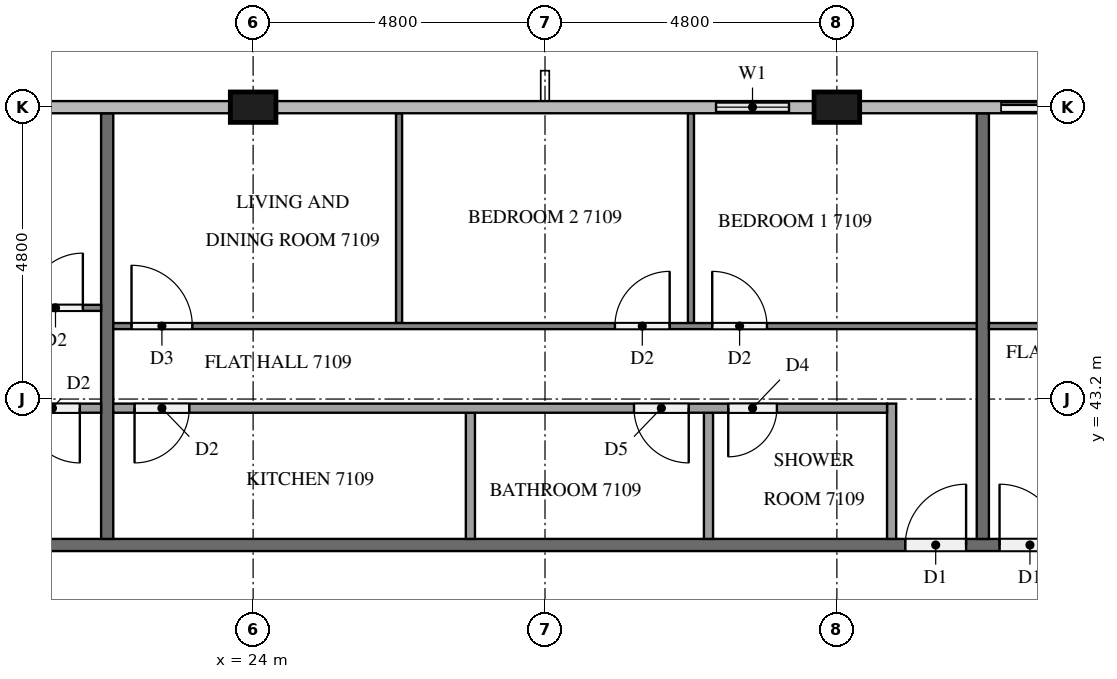
"""IFC4 building model, lengths in metres.
Left out: names, types, materials, properties, quantities, classifications, styles, units other than length and angle.
Written with IfcOpenShell. Run it as: python <this file> out.ifc"""

import sys

from ifc_helpers import new_model, si_unit, direction, frame, frame_2d, origin, origin_2d, place, context, subcontext, project, spatial, rectangle, extrude, element, fill, save


model = new_model("IFC4")
c1 = context("Model", 3, precision=1e-05, world=origin(), true_north=direction((0.0, 1.0)))
c2 = subcontext(c1, "Body", "Model", "MODEL_VIEW")
j1 = project(units=[si_unit("LENGTHUNIT", "METRE"), si_unit("PLANEANGLEUNIT", "RADIAN")], contexts=[c1])
p1 = place(None, origin())
s1 = spatial("IfcSite", under=j1, at=p1, CompositionType="ELEMENT")
p2 = place(p1, origin())
s2 = spatial("IfcBuilding", under=s1, at=p2, CompositionType="ELEMENT")
p3 = place(p2, frame((0.0, 0.0, 272.1)))
s3 = spatial("IfcBuildingStorey", under=s2, at=p3, CompositionType="ELEMENT", Elevation=272.1)
for number, where, z_axis, x_axis in (
    (1, (33.6, 48.0, 0.0), (0.0, 0.0, 1.0), (1.0, 0.0, 0.0)),
    (2, (24.0, 48.0, 0.0), (0.0, 0.0, 1.0), (1.0, 0.0, 0.0)),
):
    element("IfcColumn", number, at=place(p3, frame(where, z_axis=z_axis, x_axis=x_axis)), inside=s3, PredefinedType="COLUMN", context=c2, shape_type="SweptSolid", body=[
        extrude(rectangle(XDim=0.75, YDim=0.5, at=origin_2d()), origin(), (0.0, 0.0, 1.0), 3.2),
    ])
p4 = place(p3, frame((38.4, 48.0, 0.0), z_axis=(0.0, 0.0, 1.0), x_axis=(-1.0, 0.0, 0.0)))
e3 = element("IfcWall", 3, at=p4, inside=s3, PredefinedType="SOLIDWALL", context=c2, shape_type="SweptSolid", body=[
    extrude(rectangle(XDim=2.4, YDim=0.15, at=frame_2d((1.2, 0.0))), origin(), (0.0, 0.0, 1.0), 3.2),
])
p5 = place(p4, frame((0.3, 0.0, 0.0)))
e4 = element("IfcOpeningElement", 4, at=p5, cuts=e3, PredefinedType="OPENING", context=c2, shape_type="SweptSolid", body=[
    extrude(rectangle(XDim=1.8, YDim=2.4, at=frame_2d((0.9, 1.2))), frame((0.0, 0.085, 0.0), z_axis=(0.0, -1.0, 0.0), x_axis=(1.0, 0.0, 0.0)), (0.0, 0.0, 1.0), 0.17),
])
p6 = place(p3, frame((33.225, 48.0, 0.0), z_axis=(0.0, 0.0, 1.0), x_axis=(-1.0, 0.0, 0.0)))
e5 = element("IfcWall", 5, at=p6, inside=s3, PredefinedType="SOLIDWALL", context=c2, shape_type="SweptSolid", body=[
    extrude(rectangle(XDim=2.025, YDim=0.15, at=frame_2d((1.013, 0.0))), origin(), (0.0, 0.0, 1.0), 3.2),
])
p7 = place(p6, frame((0.413, 0.0, 0.9)))
e6 = element("IfcOpeningElement", 6, at=p7, cuts=e5, PredefinedType="OPENING", context=c2, shape_type="SweptSolid", body=[
    extrude(rectangle(XDim=1.2, YDim=1.4, at=frame_2d((0.6, 0.7))), frame((0.0, 0.085, 0.0), z_axis=(0.0, -1.0, 0.0), x_axis=(1.0, 0.0, 0.0)), (0.0, 0.0, 1.0), 0.17),
])
p8 = place(p3, frame((11.9, 40.8, 0.0), z_axis=(0.0, 0.0, 1.0), x_axis=(1.0, 0.0, 0.0)))
e7 = element("IfcWall", 7, at=p8, inside=s3, PredefinedType="PARTITIONING", context=c2, shape_type="SweptSolid", body=[
    extrude(rectangle(XDim=38.6, YDim=0.2, at=frame_2d((19.3, 0.0))), origin(), (0.0, 0.0, 1.0), 3.2),
])
p9 = place(p8, frame((31.575, 0.0, 0.0)))
e8 = element("IfcOpeningElement", 8, at=p9, cuts=e7, PredefinedType="OPENING", context=c2, shape_type="SweptSolid", body=[
    extrude(rectangle(XDim=1.0, YDim=2.1, at=frame_2d((0.5, 1.05))), frame((0.0, 0.11, 0.0), z_axis=(0.0, -1.0, 0.0), x_axis=(1.0, 0.0, 0.0)), (0.0, 0.0, 1.0), 0.22),
])
p10 = place(p8, frame((24.375, 0.0, 0.0)))
e9 = element("IfcOpeningElement", 9, at=p10, cuts=e7, PredefinedType="OPENING", context=c2, shape_type="SweptSolid", body=[
    extrude(rectangle(XDim=1.0, YDim=2.1, at=frame_2d((0.5, 1.05))), frame((0.0, 0.11, 0.0), z_axis=(0.0, -1.0, 0.0), x_axis=(1.0, 0.0, 0.0)), (0.0, 0.0, 1.0), 0.22),
])
p11 = place(p8, frame((22.825, 0.0, 0.0)))
e10 = element("IfcOpeningElement", 10, at=p11, cuts=e7, PredefinedType="OPENING", context=c2, shape_type="SweptSolid", body=[
    extrude(rectangle(XDim=1.0, YDim=2.1, at=frame_2d((0.5, 1.05))), frame((0.0, 0.11, 0.0), z_axis=(0.0, -1.0, 0.0), x_axis=(1.0, 0.0, 0.0)), (0.0, 0.0, 1.0), 0.22),
])
p12 = place(p8, frame((0.375, 0.0, 0.0)))
e11 = element("IfcOpeningElement", 11, at=p12, cuts=e7, PredefinedType="OPENING", context=c2, shape_type="SweptSolid", body=[
    extrude(rectangle(XDim=1.0, YDim=2.1, at=frame_2d((0.5, 1.05))), frame((0.0, 0.11, 0.0), z_axis=(0.0, -1.0, 0.0), x_axis=(1.0, 0.0, 0.0)), (0.0, 0.0, 1.0), 0.22),
])
for number, where, z_axis, x_axis in (
    (12, (36.0, 47.9, 0.0), (0.0, 0.0, 1.0), (0.0, -1.0, 0.0)),
    (13, (21.6, 47.9, 0.0), (0.0, 0.0, 1.0), (0.0, -1.0, 0.0)),
):
    element("IfcWall", number, at=place(p3, frame(where, z_axis=z_axis, x_axis=x_axis)), inside=s3, PredefinedType="PARTITIONING", context=c2, shape_type="SweptSolid", body=[
        extrude(rectangle(XDim=7.0, YDim=0.2, at=frame_2d((3.5, 0.0))), origin(), (0.0, 0.0, 1.0), 3.2),
    ])
p13 = place(p3, frame((36.1, 44.4, 0.0), z_axis=(0.0, 0.0, 1.0), x_axis=(1.0, 0.0, 0.0)))
e14 = element("IfcWall", 14, at=p13, inside=s3, PredefinedType="PARTITIONING", context=c2, shape_type="SweptSolid", body=[
    extrude(rectangle(XDim=7.0, YDim=0.1, at=frame_2d((3.5, 0.0))), origin(), (0.0, 0.0, 1.0), 3.2),
])
p14 = place(p13, frame((5.7, 0.0, 0.0)))
e15 = element("IfcOpeningElement", 15, at=p14, cuts=e14, PredefinedType="OPENING", context=c2, shape_type="SweptSolid", body=[
    extrude(rectangle(XDim=1.0, YDim=2.1, at=frame_2d((0.5, 1.05))), frame((0.0, 0.06, 0.0), z_axis=(0.0, -1.0, 0.0), x_axis=(1.0, 0.0, 0.0)), (0.0, 0.0, 1.0), 0.12),
])
for number, where, z_axis, x_axis in (
    (16, (31.2, 44.45, 0.0), (0.0, 0.0, 1.0), (0.0, 1.0, 0.0)),
    (17, (26.4, 44.45, 0.0), (0.0, 0.0, 1.0), (0.0, 1.0, 0.0)),
):
    element("IfcWall", number, at=place(p3, frame(where, z_axis=z_axis, x_axis=x_axis)), inside=s3, PredefinedType="PARTITIONING", context=c2, shape_type="SweptSolid", body=[
        extrude(rectangle(XDim=3.45, YDim=0.1, at=frame_2d((1.725, 0.0))), origin(), (0.0, 0.0, 1.0), 3.2),
    ])
p15 = place(p3, frame((21.7, 44.4, 0.0), z_axis=(0.0, 0.0, 1.0), x_axis=(1.0, 0.0, 0.0)))
e18 = element("IfcWall", 18, at=p15, inside=s3, PredefinedType="PARTITIONING", context=c2, shape_type="SweptSolid", body=[
    extrude(rectangle(XDim=14.2, YDim=0.1, at=frame_2d((7.1, 0.0))), origin(), (0.0, 0.0, 1.0), 3.2),
])
p16 = place(p15, frame((9.85, 0.0, 0.0)))
e19 = element("IfcOpeningElement", 19, at=p16, cuts=e18, PredefinedType="OPENING", context=c2, shape_type="SweptSolid", body=[
    extrude(rectangle(XDim=0.9, YDim=2.1, at=frame_2d((0.45, 1.05))), frame((0.0, 0.06, 0.0), z_axis=(0.0, -1.0, 0.0), x_axis=(1.0, 0.0, 0.0)), (0.0, 0.0, 1.0), 0.12),
])
p17 = place(p15, frame((8.25, 0.0, 0.0)))
e20 = element("IfcOpeningElement", 20, at=p17, cuts=e18, PredefinedType="OPENING", context=c2, shape_type="SweptSolid", body=[
    extrude(rectangle(XDim=0.9, YDim=2.1, at=frame_2d((0.45, 1.05))), frame((0.0, 0.06, 0.0), z_axis=(0.0, -1.0, 0.0), x_axis=(1.0, 0.0, 0.0)), (0.0, 0.0, 1.0), 0.12),
])
p18 = place(p15, frame((0.3, 0.0, 0.0)))
e21 = element("IfcOpeningElement", 21, at=p18, cuts=e18, PredefinedType="OPENING", context=c2, shape_type="SweptSolid", body=[
    extrude(rectangle(XDim=1.0, YDim=2.1, at=frame_2d((0.5, 1.05))), frame((0.0, 0.06, 0.0), z_axis=(0.0, -1.0, 0.0), x_axis=(1.0, 0.0, 0.0)), (0.0, 0.0, 1.0), 0.12),
])
for number, where, z_axis, x_axis in (
    (22, (31.489, 40.9, 0.0), (0.0, 0.0, 1.0), (0.0, 1.0, 0.0)),
    (23, (27.573, 40.9, 0.0), (0.0, 0.0, 1.0), (0.0, 1.0, 0.0)),
):
    element("IfcWall", number, at=place(p3, frame(where, z_axis=z_axis, x_axis=x_axis)), inside=s3, PredefinedType="PARTITIONING", context=c2, shape_type="SweptSolid", body=[
        extrude(rectangle(XDim=2.075, YDim=0.15, at=frame_2d((1.038, 0.0))), origin(), (0.0, 0.0, 1.0), 3.2),
    ])
p19 = place(p3, frame((34.5, 40.9, 0.0), z_axis=(0.0, 0.0, 1.0), x_axis=(0.0, 1.0, 0.0)))
e24 = element("IfcWall", 24, at=p19, inside=s3, PredefinedType="PARTITIONING", context=c2, shape_type="SweptSolid", body=[
    extrude(rectangle(XDim=2.225, YDim=0.15, at=frame_2d((1.113, 0.0))), origin(), (0.0, 0.0, 1.0), 3.2),
])
p20 = place(p3, frame((34.425, 43.05, 0.0), z_axis=(0.0, 0.0, 1.0), x_axis=(-1.0, 0.0, 0.0)))
e25 = element("IfcWall", 25, at=p20, inside=s3, PredefinedType="PARTITIONING", context=c2, shape_type="SweptSolid", body=[
    extrude(rectangle(XDim=12.725, YDim=0.15, at=frame_2d((6.363, 0.0))), origin(), (0.0, 0.0, 1.0), 3.2),
])
p21 = place(p20, frame((1.812, 0.0, 0.0)))
e26 = element("IfcOpeningElement", 26, at=p21, cuts=e25, PredefinedType="OPENING", context=c2, shape_type="SweptSolid", body=[
    extrude(rectangle(XDim=0.8, YDim=2.1, at=frame_2d((0.4, 1.05))), frame((0.0, 0.085, 0.0), z_axis=(0.0, -1.0, 0.0), x_axis=(1.0, 0.0, 0.0)), (0.0, 0.0, 1.0), 0.17),
])
p22 = place(p20, frame((3.261, 0.0, 0.0)))
e27 = element("IfcOpeningElement", 27, at=p22, cuts=e25, PredefinedType="OPENING", context=c2, shape_type="SweptSolid", body=[
    extrude(rectangle(XDim=0.9, YDim=2.1, at=frame_2d((0.45, 1.05))), frame((0.0, 0.085, 0.0), z_axis=(0.0, -1.0, 0.0), x_axis=(1.0, 0.0, 0.0)), (0.0, 0.0, 1.0), 0.17),
])
p23 = place(p20, frame((11.475, 0.0, 0.0)))
e28 = element("IfcOpeningElement", 28, at=p23, cuts=e25, PredefinedType="OPENING", context=c2, shape_type="SweptSolid", body=[
    extrude(rectangle(XDim=0.9, YDim=2.1, at=frame_2d((0.45, 1.05))), frame((0.0, 0.085, 0.0), z_axis=(0.0, -1.0, 0.0), x_axis=(1.0, 0.0, 0.0)), (0.0, 0.0, 1.0), 0.17),
])
p24 = place(p3, frame((12.1, 44.7, 0.0), z_axis=(0.0, 0.0, 1.0), x_axis=(1.0, 0.0, 0.0)))
e29 = element("IfcWall", 29, at=p24, inside=s3, PredefinedType="PARTITIONING", context=c2, shape_type="SweptSolid", body=[
    extrude(rectangle(XDim=9.4, YDim=0.1, at=frame_2d((4.7, 0.0))), origin(), (0.0, 0.0, 1.0), 3.2),
])
p25 = place(p24, frame((0.3, 0.0, 0.0)))
e30 = element("IfcOpeningElement", 30, at=p25, cuts=e29, PredefinedType="OPENING", context=c2, shape_type="SweptSolid", body=[
    extrude(rectangle(XDim=1.0, YDim=2.1, at=frame_2d((0.5, 1.05))), frame((0.0, 0.06, 0.0), z_axis=(0.0, -1.0, 0.0), x_axis=(1.0, 0.0, 0.0)), (0.0, 0.0, 1.0), 0.12),
])
p26 = place(p24, frame((8.2, 0.0, 0.0)))
e31 = element("IfcOpeningElement", 31, at=p26, cuts=e29, PredefinedType="OPENING", context=c2, shape_type="SweptSolid", body=[
    extrude(rectangle(XDim=0.9, YDim=2.1, at=frame_2d((0.45, 1.05))), frame((0.0, 0.06, 0.0), z_axis=(0.0, -1.0, 0.0), x_axis=(1.0, 0.0, 0.0)), (0.0, 0.0, 1.0), 0.12),
])
p27 = place(p3, frame((21.5, 43.05, 0.0), z_axis=(0.0, 0.0, 1.0), x_axis=(-1.0, 0.0, 0.0)))
e32 = element("IfcWall", 32, at=p27, inside=s3, PredefinedType="PARTITIONING", context=c2, shape_type="SweptSolid", body=[
    extrude(rectangle(XDim=7.925, YDim=0.15, at=frame_2d((3.962, 0.0))), origin(), (0.0, 0.0, 1.0), 3.2),
])
p28 = place(p27, frame((6.825, 0.0, 0.0)))
e33 = element("IfcOpeningElement", 33, at=p28, cuts=e32, PredefinedType="OPENING", context=c2, shape_type="SweptSolid", body=[
    extrude(rectangle(XDim=0.8, YDim=2.1, at=frame_2d((0.4, 1.05))), frame((0.0, 0.085, 0.0), z_axis=(0.0, -1.0, 0.0), x_axis=(1.0, 0.0, 0.0)), (0.0, 0.0, 1.0), 0.17),
])
p29 = place(p27, frame((0.35, 0.0, 0.0)))
e34 = element("IfcOpeningElement", 34, at=p29, cuts=e32, PredefinedType="OPENING", context=c2, shape_type="SweptSolid", body=[
    extrude(rectangle(XDim=0.9, YDim=2.1, at=frame_2d((0.45, 1.05))), frame((0.0, 0.085, 0.0), z_axis=(0.0, -1.0, 0.0), x_axis=(1.0, 0.0, 0.0)), (0.0, 0.0, 1.0), 0.17),
])
p30 = place(p5, origin())
e35 = element("IfcDoor", 35, at=p30, inside=s3, OperationType="SLIDING_TO_RIGHT", PredefinedType="DOOR", context=c2, shape_type="SweptSolid", body=[
    extrude(rectangle(XDim=1.8, YDim=2.4, at=frame_2d((0.9, 1.2))), frame((0.0, 0.025, 0.0), z_axis=(0.0, -1.0, 0.0), x_axis=(1.0, 0.0, 0.0)), (0.0, 0.0, 1.0), 0.05),
])
fill(e4, e35)
p31 = place(p7, origin())
e36 = element("IfcWindow", 36, at=p31, inside=s3, PartitioningType="SINGLE_PANEL", PredefinedType="WINDOW", context=c2, shape_type="SweptSolid", body=[
    extrude(rectangle(XDim=1.2, YDim=1.4, at=frame_2d((0.6, 0.7))), frame((0.0, 0.03, 0.0), z_axis=(0.0, -1.0, 0.0), x_axis=(1.0, 0.0, 0.0)), (0.0, 0.0, 1.0), 0.06),
])
fill(e6, e36)
p32 = place(p10, origin())
e37 = element("IfcDoor", 37, at=p32, inside=s3, OperationType="SINGLE_SWING_LEFT", PredefinedType="DOOR", context=c2, shape_type="SweptSolid", body=[
    extrude(rectangle(XDim=1.0, YDim=2.1, at=frame_2d((0.5, 1.05))), frame((0.0, 0.025, 0.0), z_axis=(0.0, -1.0, 0.0), x_axis=(1.0, 0.0, 0.0)), (0.0, 0.0, 1.0), 0.05),
])
fill(e9, e37)
p33 = place(p11, origin())
e38 = element("IfcDoor", 38, at=p33, inside=s3, OperationType="SINGLE_SWING_RIGHT", PredefinedType="DOOR", context=c2, shape_type="SweptSolid", body=[
    extrude(rectangle(XDim=1.0, YDim=2.1, at=frame_2d((0.5, 1.05))), frame((0.0, 0.025, 0.0), z_axis=(0.0, -1.0, 0.0), x_axis=(1.0, 0.0, 0.0)), (0.0, 0.0, 1.0), 0.05),
])
fill(e10, e38)
p34 = place(p16, origin())
e39 = element("IfcDoor", 39, at=p34, inside=s3, OperationType="SINGLE_SWING_LEFT", PredefinedType="DOOR", context=c2, shape_type="SweptSolid", body=[
    extrude(rectangle(XDim=0.9, YDim=2.1, at=frame_2d((0.45, 1.05))), frame((0.0, 0.025, 0.0), z_axis=(0.0, -1.0, 0.0), x_axis=(1.0, 0.0, 0.0)), (0.0, 0.0, 1.0), 0.05),
])
fill(e19, e39)
p35 = place(p17, origin())
e40 = element("IfcDoor", 40, at=p35, inside=s3, OperationType="SINGLE_SWING_RIGHT", PredefinedType="DOOR", context=c2, shape_type="SweptSolid", body=[
    extrude(rectangle(XDim=0.9, YDim=2.1, at=frame_2d((0.45, 1.05))), frame((0.0, 0.025, 0.0), z_axis=(0.0, -1.0, 0.0), x_axis=(1.0, 0.0, 0.0)), (0.0, 0.0, 1.0), 0.05),
])
fill(e20, e40)
p36 = place(p18, origin())
e41 = element("IfcDoor", 41, at=p36, inside=s3, OperationType="SINGLE_SWING_LEFT", PredefinedType="DOOR", context=c2, shape_type="SweptSolid", body=[
    extrude(rectangle(XDim=1.0, YDim=2.1, at=frame_2d((0.5, 1.05))), frame((0.0, 0.025, 0.0), z_axis=(0.0, -1.0, 0.0), x_axis=(1.0, 0.0, 0.0)), (0.0, 0.0, 1.0), 0.05),
])
fill(e21, e41)
p37 = place(p21, origin())
e42 = element("IfcDoor", 42, at=p37, inside=s3, OperationType="SINGLE_SWING_RIGHT", PredefinedType="DOOR", context=c2, shape_type="SweptSolid", body=[
    extrude(rectangle(XDim=0.8, YDim=2.1, at=frame_2d((0.4, 1.05))), frame((0.0, 0.025, 0.0), z_axis=(0.0, -1.0, 0.0), x_axis=(1.0, 0.0, 0.0)), (0.0, 0.0, 1.0), 0.05),
])
fill(e26, e42)
p38 = place(p22, origin())
e43 = element("IfcDoor", 43, at=p38, inside=s3, OperationType="SINGLE_SWING_LEFT", PredefinedType="DOOR", context=c2, shape_type="SweptSolid", body=[
    extrude(rectangle(XDim=0.9, YDim=2.1, at=frame_2d((0.45, 1.05))), frame((0.0, 0.025, 0.0), z_axis=(0.0, -1.0, 0.0), x_axis=(1.0, 0.0, 0.0)), (0.0, 0.0, 1.0), 0.05),
])
fill(e27, e43)
p39 = place(p23, origin())
e44 = element("IfcDoor", 44, at=p39, inside=s3, OperationType="SINGLE_SWING_RIGHT", PredefinedType="DOOR", context=c2, shape_type="SweptSolid", body=[
    extrude(rectangle(XDim=0.9, YDim=2.1, at=frame_2d((0.45, 1.05))), frame((0.0, 0.025, 0.0), z_axis=(0.0, -1.0, 0.0), x_axis=(1.0, 0.0, 0.0)), (0.0, 0.0, 1.0), 0.05),
])
fill(e28, e44)
p40 = place(p26, origin())
e45 = element("IfcDoor", 45, at=p40, inside=s3, OperationType="SINGLE_SWING_RIGHT", PredefinedType="DOOR", context=c2, shape_type="SweptSolid", body=[
    extrude(rectangle(XDim=0.9, YDim=2.1, at=frame_2d((0.45, 1.05))), frame((0.0, 0.025, 0.0), z_axis=(0.0, -1.0, 0.0), x_axis=(1.0, 0.0, 0.0)), (0.0, 0.0, 1.0), 0.05),
])
fill(e31, e45)
p41 = place(p29, origin())
e46 = element("IfcDoor", 46, at=p41, inside=s3, OperationType="SINGLE_SWING_LEFT", PredefinedType="DOOR", context=c2, shape_type="SweptSolid", body=[
    extrude(rectangle(XDim=0.9, YDim=2.1, at=frame_2d((0.45, 1.05))), frame((0.0, 0.025, 0.0), z_axis=(0.0, -1.0, 0.0), x_axis=(1.0, 0.0, 0.0)), (0.0, 0.0, 1.0), 0.05),
])
fill(e34, e46)
save(model, sys.argv[1])
